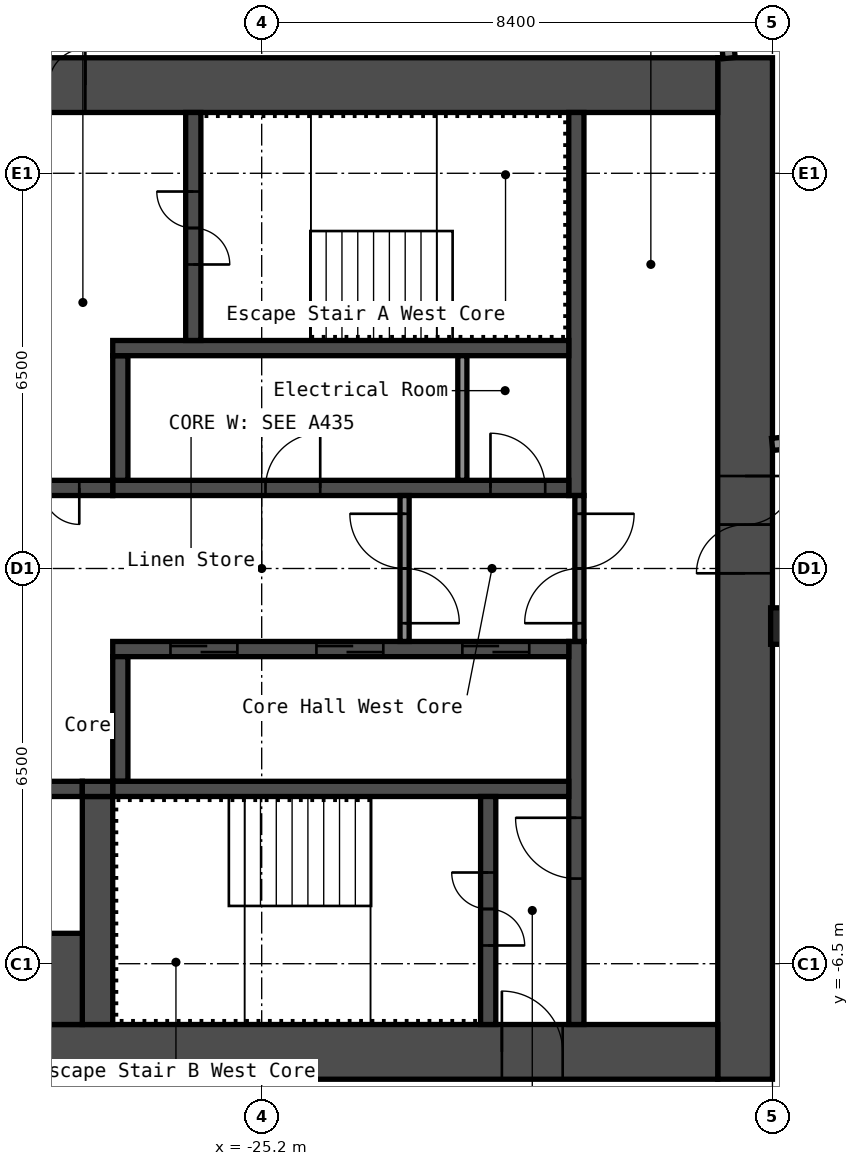
"""IFC4 building model, lengths in metres.
Left out: names, types, materials, properties, quantities, classifications, styles, units other than length and angle.
Written with IfcOpenShell. Run it as: python <this file> out.ifc"""

import sys

from ifc_helpers import new_model, si_unit, direction, frame, frame_2d, origin, origin_2d, place, context, subcontext, project, spatial, rectangle, hollow_rectangle, extrude, element, fill, save


model = new_model("IFC4")
c1 = context("Model", 3, precision=1e-05, world=origin(), true_north=direction((0.0, 1.0)))
c2 = subcontext(c1, "Body", "Model", "MODEL_VIEW")
j1 = project(units=[si_unit("LENGTHUNIT", "METRE"), si_unit("PLANEANGLEUNIT", "RADIAN")], contexts=[c1])
p1 = place(None, origin())
s1 = spatial("IfcSite", under=j1, at=p1, CompositionType="ELEMENT")
p2 = place(p1, origin())
s2 = spatial("IfcBuilding", under=s1, at=p2, CompositionType="ELEMENT")
p3 = place(p2, frame((0.0, 0.0, 242.2)))
s3 = spatial("IfcBuildingStorey", under=s2, at=p3, CompositionType="ELEMENT", Elevation=242.2)
p4 = place(p3, frame((-16.53, -0.947, 0.0), z_axis=(0.0, 0.0, 1.0), x_axis=(1.0, 0.0, 0.0)))
e1 = element("IfcColumn", 1, at=p4, inside=s3, PredefinedType="COLUMN", context=c2, shape_type="SweptSolid", body=[
    extrude(hollow_rectangle(XDim=0.6, YDim=0.6, WallThickness=0.025, InnerFilletRadius=0.038, OuterFilletRadius=0.062, at=origin_2d()), origin(), (0.0, 0.0, 1.0), 2.75),
])
p5 = place(p3, frame((-17.25, -8.4, 0.0), z_axis=(0.0, 0.0, 1.0), x_axis=(0.0, 1.0, 0.0)))
e2 = element("IfcWall", 2, at=p5, inside=s3, PredefinedType="SHEAR", context=c2, shape_type="SweptSolid", body=[
    extrude(rectangle(XDim=16.8, YDim=0.9, at=frame_2d((8.4, 0.0))), origin(), (0.0, 0.0, 1.0), 2.75),
])
p6 = place(p5, frame((8.321, 0.0, 0.0)))
e3 = element("IfcOpeningElement", 3, at=p6, cuts=e2, PredefinedType="OPENING", context=c2, shape_type="SweptSolid", body=[
    extrude(rectangle(XDim=1.6, YDim=2.1, at=frame_2d((0.8, 1.05))), frame((0.0, 0.46, 0.0), z_axis=(0.0, -1.0, 0.0), x_axis=(1.0, 0.0, 0.0)), (0.0, 0.0, 1.0), 0.92),
])
p7 = place(p3, frame((-32.7, 7.95, 0.0), z_axis=(0.0, 0.0, 1.0), x_axis=(1.0, 0.0, 0.0)))
e4 = element("IfcWall", 4, at=p7, inside=s3, PredefinedType="SHEAR", context=c2, shape_type="SweptSolid", body=[
    extrude(rectangle(XDim=15.0, YDim=0.9, at=frame_2d((7.5, 0.0))), origin(), (0.0, 0.0, 1.0), 2.75),
])
p8 = place(p7, frame((3.4, 0.0, 0.0)))
e5 = element("IfcOpeningElement", 5, at=p8, cuts=e4, PredefinedType="OPENING", context=c2, shape_type="SweptSolid", body=[
    extrude(rectangle(XDim=1.2, YDim=2.1, at=frame_2d((0.6, 1.05))), frame((0.0, 0.46, 0.0), z_axis=(0.0, -1.0, 0.0), x_axis=(1.0, 0.0, 0.0)), (0.0, 0.0, 1.0), 0.92),
])
p9 = place(p7, frame((0.75, 0.0, 0.0)))
e6 = element("IfcOpeningElement", 6, at=p9, cuts=e4, PredefinedType="OPENING", context=c2, shape_type="SweptSolid", body=[
    extrude(rectangle(XDim=0.9, YDim=2.1, at=frame_2d((0.45, 1.05))), frame((0.0, 0.46, 0.0), z_axis=(0.0, -1.0, 0.0), x_axis=(1.0, 0.0, 0.0)), (0.0, 0.0, 1.0), 0.92),
])
p10 = place(p3, frame((-32.7, -7.95, 0.0), z_axis=(0.0, 0.0, 1.0), x_axis=(1.0, 0.0, 0.0)))
e7 = element("IfcWall", 7, at=p10, inside=s3, PredefinedType="SHEAR", context=c2, shape_type="SweptSolid", body=[
    extrude(rectangle(XDim=15.0, YDim=0.9, at=frame_2d((7.5, 0.0))), origin(), (0.0, 0.0, 1.0), 2.75),
])
p11 = place(p10, frame((11.45, 0.0, 0.0)))
e8 = element("IfcOpeningElement", 8, at=p11, cuts=e7, PredefinedType="OPENING", context=c2, shape_type="SweptSolid", body=[
    extrude(rectangle(XDim=1.0, YDim=2.1, at=frame_2d((0.5, 1.05))), frame((0.0, 0.46, 0.0), z_axis=(0.0, -1.0, 0.0), x_axis=(1.0, 0.0, 0.0)), (0.0, 0.0, 1.0), 0.92),
])
p12 = place(p3, frame((-20.025, 1.2, 0.0), z_axis=(0.0, 0.0, 1.0), x_axis=(0.0, 1.0, 0.0)))
e9 = element("IfcWall", 9, at=p12, inside=s3, PredefinedType="SHEAR", context=c2, shape_type="SweptSolid", body=[
    extrude(rectangle(XDim=6.3, YDim=0.25, at=frame_2d((3.15, 0.0))), origin(), (0.0, 0.0, 1.0), 2.75),
])
p13 = place(p3, frame((-20.025, -7.5, 0.0), z_axis=(0.0, 0.0, 1.0), x_axis=(0.0, 1.0, 0.0)))
e10 = element("IfcWall", 10, at=p13, inside=s3, PredefinedType="SHEAR", context=c2, shape_type="SweptSolid", body=[
    extrude(rectangle(XDim=6.3, YDim=0.25, at=frame_2d((3.15, 0.0))), origin(), (0.0, 0.0, 1.0), 2.75),
])
p14 = place(p13, frame((2.4, 0.0, 0.0)))
e11 = element("IfcOpeningElement", 11, at=p14, cuts=e10, PredefinedType="OPENING", context=c2, shape_type="SweptSolid", body=[
    extrude(rectangle(XDim=1.0, YDim=2.1, at=frame_2d((0.5, 1.05))), frame((0.0, 0.135, 0.0), z_axis=(0.0, -1.0, 0.0), x_axis=(1.0, 0.0, 0.0)), (0.0, 0.0, 1.0), 0.27),
])
p15 = place(p3, frame((-27.65, 1.325, 0.0), z_axis=(0.0, 0.0, 1.0), x_axis=(1.0, 0.0, 0.0)))
e12 = element("IfcWall", 12, at=p15, inside=s3, PredefinedType="SHEAR", context=c2, shape_type="SweptSolid", body=[
    extrude(rectangle(XDim=7.5, YDim=0.25, at=frame_2d((3.75, 0.0))), origin(), (0.0, 0.0, 1.0), 2.75),
])
p16 = place(p15, frame((6.212, 0.0, 0.0)))
e13 = element("IfcOpeningElement", 13, at=p16, cuts=e12, PredefinedType="OPENING", context=c2, shape_type="SweptSolid", body=[
    extrude(rectangle(XDim=0.9, YDim=2.1, at=frame_2d((0.45, 1.05))), frame((0.0, 0.135, 0.0), z_axis=(0.0, -1.0, 0.0), x_axis=(1.0, 0.0, 0.0)), (0.0, 0.0, 1.0), 0.27),
])
p17 = place(p15, frame((2.512, 0.0, 0.0)))
e14 = element("IfcOpeningElement", 14, at=p17, cuts=e12, PredefinedType="OPENING", context=c2, shape_type="SweptSolid", body=[
    extrude(rectangle(XDim=0.9, YDim=2.1, at=frame_2d((0.45, 1.05))), frame((0.0, 0.135, 0.0), z_axis=(0.0, -1.0, 0.0), x_axis=(1.0, 0.0, 0.0)), (0.0, 0.0, 1.0), 0.27),
])
p18 = place(p3, frame((-27.525, 1.45, 0.0), z_axis=(0.0, 0.0, 1.0), x_axis=(0.0, 1.0, 0.0)))
e15 = element("IfcWall", 15, at=p18, inside=s3, PredefinedType="SHEAR", context=c2, shape_type="SweptSolid", body=[
    extrude(rectangle(XDim=2.05, YDim=0.25, at=frame_2d((1.025, 0.0))), origin(), (0.0, 0.0, 1.0), 2.75),
])
p19 = place(p3, frame((-27.65, 3.625, 0.0), z_axis=(0.0, 0.0, 1.0), x_axis=(1.0, 0.0, 0.0)))
e16 = element("IfcWall", 16, at=p19, inside=s3, PredefinedType="SHEAR", context=c2, shape_type="SweptSolid", body=[
    extrude(rectangle(XDim=7.5, YDim=0.25, at=frame_2d((3.75, 0.0))), origin(), (0.0, 0.0, 1.0), 2.75),
])
p20 = place(p3, frame((-26.325, 3.75, 0.0), z_axis=(0.0, 0.0, 1.0), x_axis=(0.0, 1.0, 0.0)))
e17 = element("IfcWall", 17, at=p20, inside=s3, PredefinedType="SHEAR", context=c2, shape_type="SweptSolid", body=[
    extrude(rectangle(XDim=3.75, YDim=0.25, at=frame_2d((1.875, 0.0))), origin(), (0.0, 0.0, 1.0), 2.75),
])
p21 = place(p20, frame((1.25, 0.0, 0.0)))
e18 = element("IfcOpeningElement", 18, at=p21, cuts=e17, PredefinedType="OPENING", context=c2, shape_type="SweptSolid", body=[
    extrude(rectangle(XDim=1.2, YDim=2.1, at=frame_2d((0.6, 1.05))), frame((0.0, 0.135, 0.0), z_axis=(0.0, -1.0, 0.0), x_axis=(1.0, 0.0, 0.0)), (0.0, 0.0, 1.0), 0.27),
])
p22 = place(p3, frame((-32.7, 1.325, 0.0), z_axis=(0.0, 0.0, 1.0), x_axis=(1.0, 0.0, 0.0)))
e19 = element("IfcWall", 19, at=p22, inside=s3, PredefinedType="SHEAR", context=c2, shape_type="SweptSolid", body=[
    extrude(rectangle(XDim=5.05, YDim=0.25, at=frame_2d((2.525, 0.0))), origin(), (0.0, 0.0, 1.0), 2.75),
])
p23 = place(p22, frame((3.3, 0.0, 0.0)))
e20 = element("IfcOpeningElement", 20, at=p23, cuts=e19, PredefinedType="OPENING", context=c2, shape_type="SweptSolid", body=[
    extrude(rectangle(XDim=1.2, YDim=2.1, at=frame_2d((0.6, 1.05))), frame((0.0, 0.135, 0.0), z_axis=(0.0, -1.0, 0.0), x_axis=(1.0, 0.0, 0.0)), (0.0, 0.0, 1.0), 0.27),
])
p24 = place(p3, frame((-27.65, -1.325, 0.0), z_axis=(0.0, 0.0, 1.0), x_axis=(1.0, 0.0, 0.0)))
e21 = element("IfcWall", 21, at=p24, inside=s3, PredefinedType="SHEAR", context=c2, shape_type="SweptSolid", body=[
    extrude(rectangle(XDim=7.5, YDim=0.25, at=frame_2d((3.75, 0.0))), origin(), (0.0, 0.0, 1.0), 2.75),
])
p25 = place(p24, frame((5.75, 0.0, 0.0)))
e22 = element("IfcOpeningElement", 22, at=p25, cuts=e21, PredefinedType="OPENING", context=c2, shape_type="SweptSolid", body=[
    extrude(rectangle(XDim=1.1, YDim=2.1, at=frame_2d((0.55, 1.05))), frame((0.0, 0.135, 0.0), z_axis=(0.0, -1.0, 0.0), x_axis=(1.0, 0.0, 0.0)), (0.0, 0.0, 1.0), 0.27),
])
p26 = place(p24, frame((3.35, 0.0, 0.0)))
e23 = element("IfcOpeningElement", 23, at=p26, cuts=e21, PredefinedType="OPENING", context=c2, shape_type="SweptSolid", body=[
    extrude(rectangle(XDim=1.1, YDim=2.1, at=frame_2d((0.55, 1.05))), frame((0.0, 0.135, 0.0), z_axis=(0.0, -1.0, 0.0), x_axis=(1.0, 0.0, 0.0)), (0.0, 0.0, 1.0), 0.27),
])
p27 = place(p24, frame((0.95, 0.0, 0.0)))
e24 = element("IfcOpeningElement", 24, at=p27, cuts=e21, PredefinedType="OPENING", context=c2, shape_type="SweptSolid", body=[
    extrude(rectangle(XDim=1.1, YDim=2.1, at=frame_2d((0.55, 1.05))), frame((0.0, 0.135, 0.0), z_axis=(0.0, -1.0, 0.0), x_axis=(1.0, 0.0, 0.0)), (0.0, 0.0, 1.0), 0.27),
])
p28 = place(p3, frame((-27.525, -3.5, 0.0), z_axis=(0.0, 0.0, 1.0), x_axis=(0.0, 1.0, 0.0)))
e25 = element("IfcWall", 25, at=p28, inside=s3, PredefinedType="SHEAR", context=c2, shape_type="SweptSolid", body=[
    extrude(rectangle(XDim=2.05, YDim=0.25, at=frame_2d((1.025, 0.0))), origin(), (0.0, 0.0, 1.0), 2.75),
])
p29 = place(p3, frame((-27.65, -3.625, 0.0), z_axis=(0.0, 0.0, 1.0), x_axis=(1.0, 0.0, 0.0)))
e26 = element("IfcWall", 26, at=p29, inside=s3, PredefinedType="SHEAR", context=c2, shape_type="SweptSolid", body=[
    extrude(rectangle(XDim=7.5, YDim=0.25, at=frame_2d((3.75, 0.0))), origin(), (0.0, 0.0, 1.0), 2.75),
])
p30 = place(p3, frame((-21.475, -7.5, 0.0), z_axis=(0.0, 0.0, 1.0), x_axis=(0.0, 1.0, 0.0)))
e27 = element("IfcWall", 27, at=p30, inside=s3, PredefinedType="SHEAR", context=c2, shape_type="SweptSolid", body=[
    extrude(rectangle(XDim=3.75, YDim=0.25, at=frame_2d((1.875, 0.0))), origin(), (0.0, 0.0, 1.0), 2.75),
])
p31 = place(p30, frame((1.3, 0.0, 0.0)))
e28 = element("IfcOpeningElement", 28, at=p31, cuts=e27, PredefinedType="OPENING", context=c2, shape_type="SweptSolid", body=[
    extrude(rectangle(XDim=1.2, YDim=2.1, at=frame_2d((0.6, 1.05))), frame((0.0, 0.135, 0.0), z_axis=(0.0, -1.0, 0.0), x_axis=(1.0, 0.0, 0.0)), (0.0, 0.0, 1.0), 0.27),
])
p32 = place(p3, frame((-27.9, -7.5, 0.0), z_axis=(0.0, 0.0, 1.0), x_axis=(0.0, 1.0, 0.0)))
e29 = element("IfcWall", 29, at=p32, inside=s3, PredefinedType="SHEAR", context=c2, shape_type="SweptSolid", body=[
    extrude(rectangle(XDim=3.75, YDim=0.5, at=frame_2d((1.875, 0.0))), origin(), (0.0, 0.0, 1.0), 2.75),
])
p33 = place(p3, frame((-32.7, -3.625, 0.0), z_axis=(0.0, 0.0, 1.0), x_axis=(1.0, 0.0, 0.0)))
e30 = element("IfcWall", 30, at=p33, inside=s3, PredefinedType="SHEAR", context=c2, shape_type="SweptSolid", body=[
    extrude(rectangle(XDim=4.55, YDim=0.25, at=frame_2d((2.275, 0.0))), origin(), (0.0, 0.0, 1.0), 2.75),
])
p34 = place(p33, frame((2.85, 0.0, 0.0)))
e31 = element("IfcOpeningElement", 31, at=p34, cuts=e30, PredefinedType="OPENING", context=c2, shape_type="SweptSolid", body=[
    extrude(rectangle(XDim=1.1, YDim=2.1, at=frame_2d((0.55, 1.05))), frame((0.0, 0.135, 0.0), z_axis=(0.0, -1.0, 0.0), x_axis=(1.0, 0.0, 0.0)), (0.0, 0.0, 1.0), 0.27),
])
p35 = place(p33, frame((0.6, 0.0, 0.0)))
e32 = element("IfcOpeningElement", 32, at=p35, cuts=e30, PredefinedType="OPENING", context=c2, shape_type="SweptSolid", body=[
    extrude(rectangle(XDim=1.1, YDim=2.1, at=frame_2d((0.55, 1.05))), frame((0.0, 0.135, 0.0), z_axis=(0.0, -1.0, 0.0), x_axis=(1.0, 0.0, 0.0)), (0.0, 0.0, 1.0), 0.27),
])
p36 = place(p3, frame((-32.7, -6.75, 0.0), z_axis=(0.0, 0.0, 1.0), x_axis=(1.0, 0.0, 0.0)))
e33 = element("IfcWall", 33, at=p36, inside=s3, PredefinedType="SHEAR", context=c2, shape_type="SweptSolid", body=[
    extrude(rectangle(XDim=4.55, YDim=1.5, at=frame_2d((2.275, 0.0))), origin(), (0.0, 0.0, 1.0), 2.75),
])
p37 = place(p3, frame((-28.15, -3.625, 0.0), z_axis=(0.0, 0.0, 1.0), x_axis=(1.0, 0.0, 0.0)))
e34 = element("IfcWall", 34, at=p37, inside=s3, PredefinedType="SHEAR", context=c2, shape_type="SweptSolid", body=[
    extrude(rectangle(XDim=0.5, YDim=0.25, at=frame_2d((0.25, 0.0))), origin(), (0.0, 0.0, 1.0), 2.75),
])
p38 = place(p3, frame((-19.975, -1.2, 0.0), z_axis=(0.0, 0.0, 1.0), x_axis=(0.0, 1.0, 0.0)))
e35 = element("IfcWall", 35, at=p38, inside=s3, PredefinedType="PARTITIONING", context=c2, shape_type="SweptSolid", body=[
    extrude(rectangle(XDim=2.4, YDim=0.15, at=frame_2d((1.2, 0.0))), origin(), (0.0, 0.0, 1.0), 2.75),
])
p39 = place(p38, frame((0.3, 0.0, 0.0)))
e36 = element("IfcOpeningElement", 36, at=p39, cuts=e35, PredefinedType="OPENING", context=c2, shape_type="SweptSolid", body=[
    extrude(rectangle(XDim=1.8, YDim=2.1, at=frame_2d((0.9, 1.05))), frame((0.0, 0.085, 0.0), z_axis=(0.0, -1.0, 0.0), x_axis=(1.0, 0.0, 0.0)), (0.0, 0.0, 1.0), 0.17),
])
p40 = place(p3, frame((-22.85, -1.2, 0.0), z_axis=(0.0, 0.0, 1.0), x_axis=(0.0, 1.0, 0.0)))
e37 = element("IfcWall", 37, at=p40, inside=s3, PredefinedType="PARTITIONING", context=c2, shape_type="SweptSolid", body=[
    extrude(rectangle(XDim=2.4, YDim=0.15, at=frame_2d((1.2, 0.0))), origin(), (0.0, 0.0, 1.0), 2.75),
])
p41 = place(p40, frame((0.3, 0.0, 0.0)))
e38 = element("IfcOpeningElement", 38, at=p41, cuts=e37, PredefinedType="OPENING", context=c2, shape_type="SweptSolid", body=[
    extrude(rectangle(XDim=1.8, YDim=2.1, at=frame_2d((0.9, 1.05))), frame((0.0, 0.085, 0.0), z_axis=(0.0, -1.0, 0.0), x_axis=(1.0, 0.0, 0.0)), (0.0, 0.0, 1.0), 0.17),
])
p42 = place(p3, frame((-21.9, 1.45, 0.0), z_axis=(0.0, 0.0, 1.0), x_axis=(0.0, 1.0, 0.0)))
e39 = element("IfcWall", 39, at=p42, inside=s3, PredefinedType="PARTITIONING", context=c2, shape_type="SweptSolid", body=[
    extrude(rectangle(XDim=2.05, YDim=0.15, at=frame_2d((1.025, 0.0))), origin(), (0.0, 0.0, 1.0), 2.75),
])
p43 = place(p3, frame((-16.805, 2.041, 0.0), z_axis=(0.0, 0.0, 1.0), x_axis=(0.994521146831, 0.104535584879, 0.0)))
e40 = element("IfcWall", 40, at=p43, inside=s3, PredefinedType="PARTITIONING", context=c2, shape_type="SweptSolid", body=[
    extrude(rectangle(XDim=33.561, YDim=0.2, at=frame_2d((16.78, 0.0))), origin(), (0.0, 0.0, 1.0), 2.75),
])
p44 = place(p43, frame((1.781, 0.0, 0.0)))
e41 = element("IfcOpeningElement", 41, at=p44, cuts=e40, PredefinedType="OPENING", context=c2, shape_type="SweptSolid", body=[
    extrude(rectangle(XDim=0.9, YDim=2.1, at=frame_2d((0.45, 1.05))), frame((0.0, 0.11, 0.0), z_axis=(0.0, -1.0, 0.0), x_axis=(1.0, 0.0, 0.0)), (0.0, 0.0, 1.0), 0.22),
])
p45 = place(p43, frame((5.981, 0.0, 0.0)))
e42 = element("IfcOpeningElement", 42, at=p45, cuts=e40, PredefinedType="OPENING", context=c2, shape_type="SweptSolid", body=[
    extrude(rectangle(XDim=0.9, YDim=2.1, at=frame_2d((0.45, 1.05))), frame((0.0, 0.11, 0.0), z_axis=(0.0, -1.0, 0.0), x_axis=(1.0, 0.0, 0.0)), (0.0, 0.0, 1.0), 0.22),
])
p46 = place(p43, frame((12.061, 0.0, 0.0)))
e43 = element("IfcOpeningElement", 43, at=p46, cuts=e40, PredefinedType="OPENING", context=c2, shape_type="SweptSolid", body=[
    extrude(rectangle(XDim=1.0, YDim=2.1, at=frame_2d((0.5, 1.05))), frame((0.0, 0.11, 0.0), z_axis=(0.0, -1.0, 0.0), x_axis=(1.0, 0.0, 0.0)), (0.0, 0.0, 1.0), 0.22),
])
p47 = place(p43, frame((19.611, 0.0, 0.0)))
e44 = element("IfcOpeningElement", 44, at=p47, cuts=e40, PredefinedType="OPENING", context=c2, shape_type="SweptSolid", body=[
    extrude(rectangle(XDim=1.0, YDim=2.1, at=frame_2d((0.5, 1.05))), frame((0.0, 0.11, 0.0), z_axis=(0.0, -1.0, 0.0), x_axis=(1.0, 0.0, 0.0)), (0.0, 0.0, 1.0), 0.22),
])
p48 = place(p43, frame((21.311, 0.0, 0.0)))
e45 = element("IfcOpeningElement", 45, at=p48, cuts=e40, PredefinedType="OPENING", context=c2, shape_type="SweptSolid", body=[
    extrude(rectangle(XDim=1.0, YDim=2.1, at=frame_2d((0.5, 1.05))), frame((0.0, 0.11, 0.0), z_axis=(0.0, -1.0, 0.0), x_axis=(1.0, 0.0, 0.0)), (0.0, 0.0, 1.0), 0.22),
])
p49 = place(p43, frame((28.861, 0.0, 0.0)))
e46 = element("IfcOpeningElement", 46, at=p49, cuts=e40, PredefinedType="OPENING", context=c2, shape_type="SweptSolid", body=[
    extrude(rectangle(XDim=1.0, YDim=2.1, at=frame_2d((0.5, 1.05))), frame((0.0, 0.11, 0.0), z_axis=(0.0, -1.0, 0.0), x_axis=(1.0, 0.0, 0.0)), (0.0, 0.0, 1.0), 0.22),
])
p50 = place(p3, frame((-17.512, 8.395, 0.0), z_axis=(0.0, 0.0, 1.0), x_axis=(-0.104524714473, 0.994522289375, 0.0)))
e47 = element("IfcWall", 47, at=p50, inside=s3, PredefinedType="PARTITIONING", context=c2, shape_type="SweptSolid", body=[
    extrude(rectangle(XDim=9.607, YDim=0.2, at=frame_2d((4.803, 0.0))), origin(), (0.0, 0.0, 1.0), 2.75),
])
p51 = place(p6, origin())
e48 = element("IfcDoor", 48, at=p51, inside=s3, OperationType="DOUBLE_DOOR_SINGLE_SWING", PredefinedType="DOOR", context=c2, shape_type="SweptSolid", body=[
    extrude(rectangle(XDim=1.6, YDim=2.1, at=frame_2d((0.8, 1.05))), frame((0.0, 0.025, 0.0), z_axis=(0.0, -1.0, 0.0), x_axis=(1.0, 0.0, 0.0)), (0.0, 0.0, 1.0), 0.05),
])
fill(e3, e48)
p52 = place(p8, origin())
e49 = element("IfcDoor", 49, at=p52, inside=s3, OperationType="DOUBLE_DOOR_SINGLE_SWING", PredefinedType="DOOR", context=c2, shape_type="SweptSolid", body=[
    extrude(rectangle(XDim=1.2, YDim=2.1, at=frame_2d((0.6, 1.05))), frame((0.0, 0.025, 0.0), z_axis=(0.0, -1.0, 0.0), x_axis=(1.0, 0.0, 0.0)), (0.0, 0.0, 1.0), 0.05),
])
fill(e5, e49)
p53 = place(p11, origin())
e50 = element("IfcDoor", 50, at=p53, inside=s3, OperationType="SINGLE_SWING_RIGHT", PredefinedType="DOOR", context=c2, shape_type="SweptSolid", body=[
    extrude(rectangle(XDim=1.0, YDim=2.1, at=frame_2d((0.5, 1.05))), frame((0.0, 0.025, 0.0), z_axis=(0.0, -1.0, 0.0), x_axis=(1.0, 0.0, 0.0)), (0.0, 0.0, 1.0), 0.05),
])
fill(e8, e50)
p54 = place(p21, origin())
e51 = element("IfcDoor", 51, at=p54, inside=s3, OperationType="DOUBLE_DOOR_SINGLE_SWING", PredefinedType="DOOR", context=c2, shape_type="SweptSolid", body=[
    extrude(rectangle(XDim=1.2, YDim=2.1, at=frame_2d((0.6, 1.05))), frame((0.0, 0.025, 0.0), z_axis=(0.0, -1.0, 0.0), x_axis=(1.0, 0.0, 0.0)), (0.0, 0.0, 1.0), 0.05),
])
fill(e18, e51)
p55 = place(p31, origin())
e52 = element("IfcDoor", 52, at=p55, inside=s3, OperationType="DOUBLE_DOOR_SINGLE_SWING", PredefinedType="DOOR", context=c2, shape_type="SweptSolid", body=[
    extrude(rectangle(XDim=1.2, YDim=2.1, at=frame_2d((0.6, 1.05))), frame((0.0, 0.025, 0.0), z_axis=(0.0, -1.0, 0.0), x_axis=(1.0, 0.0, 0.0)), (0.0, 0.0, 1.0), 0.05),
])
fill(e28, e52)
p56 = place(p14, origin())
e53 = element("IfcDoor", 53, at=p56, inside=s3, OperationType="SINGLE_SWING_LEFT", PredefinedType="DOOR", context=c2, shape_type="SweptSolid", body=[
    extrude(rectangle(XDim=1.0, YDim=2.1, at=frame_2d((0.5, 1.05))), frame((0.0, 0.025, 0.0), z_axis=(0.0, -1.0, 0.0), x_axis=(1.0, 0.0, 0.0)), (0.0, 0.0, 1.0), 0.05),
])
fill(e11, e53)
p57 = place(p23, origin())
e54 = element("IfcDoor", 54, at=p57, inside=s3, OperationType="DOUBLE_DOOR_SINGLE_SWING", PredefinedType="DOOR", context=c2, shape_type="SweptSolid", body=[
    extrude(rectangle(XDim=1.2, YDim=2.1, at=frame_2d((0.6, 1.05))), frame((0.0, 0.025, 0.0), z_axis=(0.0, -1.0, 0.0), x_axis=(1.0, 0.0, 0.0)), (0.0, 0.0, 1.0), 0.05),
])
fill(e20, e54)
p58 = place(p39, origin())
e55 = element("IfcDoor", 55, at=p58, inside=s3, OperationType="DOUBLE_DOOR_SINGLE_SWING", PredefinedType="DOOR", context=c2, shape_type="SweptSolid", body=[
    extrude(rectangle(XDim=1.8, YDim=2.1, at=frame_2d((0.9, 1.05))), frame((0.0, 0.025, 0.0), z_axis=(0.0, -1.0, 0.0), x_axis=(1.0, 0.0, 0.0)), (0.0, 0.0, 1.0), 0.05),
])
fill(e36, e55)
p59 = place(p41, origin())
e56 = element("IfcDoor", 56, at=p59, inside=s3, OperationType="DOUBLE_DOOR_SINGLE_SWING", PredefinedType="DOOR", context=c2, shape_type="SweptSolid", body=[
    extrude(rectangle(XDim=1.8, YDim=2.1, at=frame_2d((0.9, 1.05))), frame((0.0, 0.025, 0.0), z_axis=(0.0, -1.0, 0.0), x_axis=(1.0, 0.0, 0.0)), (0.0, 0.0, 1.0), 0.05),
])
fill(e38, e56)
p60 = place(p16, origin())
e57 = element("IfcDoor", 57, at=p60, inside=s3, OperationType="SINGLE_SWING_RIGHT", PredefinedType="DOOR", context=c2, shape_type="SweptSolid", body=[
    extrude(rectangle(XDim=0.9, YDim=2.1, at=frame_2d((0.45, 1.05))), frame((0.0, 0.025, 0.0), z_axis=(0.0, -1.0, 0.0), x_axis=(1.0, 0.0, 0.0)), (0.0, 0.0, 1.0), 0.05),
])
fill(e13, e57)
p61 = place(p17, origin())
e58 = element("IfcDoor", 58, at=p61, inside=s3, OperationType="SINGLE_SWING_LEFT", PredefinedType="DOOR", context=c2, shape_type="SweptSolid", body=[
    extrude(rectangle(XDim=0.9, YDim=2.1, at=frame_2d((0.45, 1.05))), frame((0.0, 0.025, 0.0), z_axis=(0.0, -1.0, 0.0), x_axis=(1.0, 0.0, 0.0)), (0.0, 0.0, 1.0), 0.05),
])
fill(e14, e58)
p62 = place(p25, origin())
e59 = element("IfcDoor", 59, at=p62, inside=s3, OperationType="DOUBLE_DOOR_SLIDING", PredefinedType="DOOR", context=c2, shape_type="SweptSolid", body=[
    extrude(rectangle(XDim=1.1, YDim=2.1, at=frame_2d((0.55, 1.05))), frame((0.0, 0.025, 0.0), z_axis=(0.0, -1.0, 0.0), x_axis=(1.0, 0.0, 0.0)), (0.0, 0.0, 1.0), 0.05),
])
fill(e22, e59)
p63 = place(p26, origin())
e60 = element("IfcDoor", 60, at=p63, inside=s3, OperationType="DOUBLE_DOOR_SLIDING", PredefinedType="DOOR", context=c2, shape_type="SweptSolid", body=[
    extrude(rectangle(XDim=1.1, YDim=2.1, at=frame_2d((0.55, 1.05))), frame((0.0, 0.025, 0.0), z_axis=(0.0, -1.0, 0.0), x_axis=(1.0, 0.0, 0.0)), (0.0, 0.0, 1.0), 0.05),
])
fill(e23, e60)
p64 = place(p27, origin())
e61 = element("IfcDoor", 61, at=p64, inside=s3, OperationType="DOUBLE_DOOR_SLIDING", PredefinedType="DOOR", context=c2, shape_type="SweptSolid", body=[
    extrude(rectangle(XDim=1.1, YDim=2.1, at=frame_2d((0.55, 1.05))), frame((0.0, 0.025, 0.0), z_axis=(0.0, -1.0, 0.0), x_axis=(1.0, 0.0, 0.0)), (0.0, 0.0, 1.0), 0.05),
])
fill(e24, e61)
save(model, sys.argv[1])
